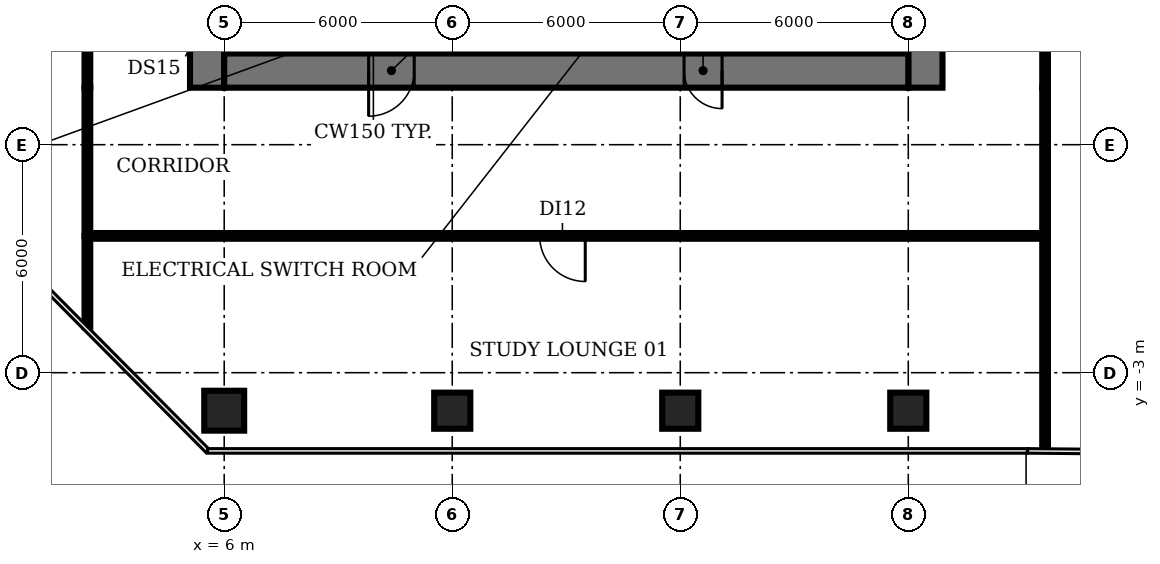
"""IFC4 building model, lengths in metres.
Left out: names, types, materials, properties, quantities, classifications, styles, units other than length and angle.
Written with IfcOpenShell. Run it as: python <this file> out.ifc"""

import sys

from ifc_helpers import new_model, si_unit, direction, frame, frame_2d, origin, origin_2d, place, context, subcontext, project, spatial, rectangle, circle, extrude, element, fill, save


model = new_model("IFC4")
c1 = context("Model", 3, precision=1e-05, world=origin(), true_north=direction((0.0, 1.0)))
c2 = subcontext(c1, "Body", "Model", "MODEL_VIEW")
j1 = project(units=[si_unit("LENGTHUNIT", "METRE"), si_unit("PLANEANGLEUNIT", "RADIAN")], contexts=[c1])
p1 = place(None, origin())
s1 = spatial("IfcSite", under=j1, at=p1, CompositionType="ELEMENT")
p2 = place(p1, origin())
s2 = spatial("IfcBuilding", under=s1, at=p2, CompositionType="ELEMENT")
p3 = place(p2, frame((0.0, 0.0, 50.0)))
s3 = spatial("IfcBuildingStorey", under=s2, at=p3, CompositionType="ELEMENT", Elevation=50.0)
p4 = place(p3, frame((6.0, -4.0, 0.0), z_axis=(0.0, 0.0, 1.0), x_axis=(1.0, 0.0, 0.0)))
e1 = element("IfcColumn", 1, at=p4, inside=s3, PredefinedType="COLUMN", context=c2, shape_type="SweptSolid", body=[
    extrude(circle(Radius=0.525, at=origin_2d()), origin(), (0.0, 0.0, 1.0), 3.85),
])
for number, where, z_axis, x_axis in (
    (2, (12.0, -4.0, 0.0), (0.0, 0.0, 1.0), (1.0, 0.0, 0.0)),
    (3, (18.0, -4.0, 0.0), (0.0, 0.0, 1.0), (1.0, 0.0, 0.0)),
    (4, (24.0, -4.0, 0.0), (0.0, 0.0, 1.0), (1.0, 0.0, 0.0)),
):
    element("IfcColumn", number, at=place(p3, frame(where, z_axis=z_axis, x_axis=x_axis)), inside=s3, PredefinedType="COLUMN", context=c2, shape_type="SweptSolid", body=[
        extrude(rectangle(XDim=0.95, YDim=0.95, at=origin_2d()), origin(), (0.0, 0.0, 1.0), 3.85),
    ])
p5 = place(p3, frame((9.275, 11.825, 0.0), z_axis=(0.0, 0.0, 1.0), x_axis=(0.0, -1.0, 0.0)))
e5 = element("IfcWall", 5, at=p5, inside=s3, PredefinedType="SHEAR", context=c2, shape_type="SweptSolid", body=[
    extrude(rectangle(XDim=6.425, YDim=0.25, at=frame_2d((3.212, 0.0))), origin(), (0.0, 0.0, 1.0), 3.85),
])
p6 = place(p5, frame((5.075, 0.0, 0.0)))
e6 = element("IfcOpeningElement", 6, at=p6, cuts=e5, PredefinedType="OPENING", context=c2, shape_type="SweptSolid", body=[
    extrude(rectangle(XDim=1.0, YDim=2.1, at=frame_2d((0.5, 1.05))), frame((0.0, 0.135, 0.0), z_axis=(0.0, -1.0, 0.0), x_axis=(1.0, 0.0, 0.0)), (0.0, 0.0, 1.0), 0.27),
])
p7 = place(p3, frame((13.5, 5.4, 0.0), z_axis=(0.0, 0.0, 1.0), x_axis=(0.0, 1.0, 0.0)))
e7 = element("IfcWall", 7, at=p7, inside=s3, PredefinedType="SHEAR", context=c2, shape_type="SweptSolid", body=[
    extrude(rectangle(XDim=8.2, YDim=0.2, at=frame_2d((4.1, 0.0))), origin(), (0.0, 0.0, 1.0), 3.85),
])
p8 = place(p7, frame((0.75, 0.0, 0.0)))
e8 = element("IfcOpeningElement", 8, at=p8, cuts=e7, PredefinedType="OPENING", context=c2, shape_type="SweptSolid", body=[
    extrude(rectangle(XDim=1.1, YDim=2.1, at=frame_2d((0.55, 1.05))), frame((0.0, 0.11, 0.0), z_axis=(0.0, -1.0, 0.0), x_axis=(1.0, 0.0, 0.0)), (0.0, 0.0, 1.0), 0.22),
])
p9 = place(p7, frame((3.55, 0.0, 0.0)))
e9 = element("IfcOpeningElement", 9, at=p9, cuts=e7, PredefinedType="OPENING", context=c2, shape_type="SweptSolid", body=[
    extrude(rectangle(XDim=1.1, YDim=2.1, at=frame_2d((0.55, 1.05))), frame((0.0, 0.11, 0.0), z_axis=(0.0, -1.0, 0.0), x_axis=(1.0, 0.0, 0.0)), (0.0, 0.0, 1.0), 0.22),
])
p10 = place(p7, frame((6.35, 0.0, 0.0)))
e10 = element("IfcOpeningElement", 10, at=p10, cuts=e7, PredefinedType="OPENING", context=c2, shape_type="SweptSolid", body=[
    extrude(rectangle(XDim=1.1, YDim=2.1, at=frame_2d((0.55, 1.05))), frame((0.0, 0.11, 0.0), z_axis=(0.0, -1.0, 0.0), x_axis=(1.0, 0.0, 0.0)), (0.0, 0.0, 1.0), 0.22),
])
p11 = place(p3, frame((16.5, 5.4, 0.0), z_axis=(0.0, 0.0, 1.0), x_axis=(0.0, 1.0, 0.0)))
e11 = element("IfcWall", 11, at=p11, inside=s3, PredefinedType="SHEAR", context=c2, shape_type="SweptSolid", body=[
    extrude(rectangle(XDim=8.2, YDim=0.2, at=frame_2d((4.1, 0.0))), origin(), (0.0, 0.0, 1.0), 3.85),
])
p12 = place(p3, frame((20.725, 5.4, 0.0), z_axis=(0.0, 0.0, 1.0), x_axis=(0.0, 1.0, 0.0)))
e12 = element("IfcWall", 12, at=p12, inside=s3, PredefinedType="SHEAR", context=c2, shape_type="SweptSolid", body=[
    extrude(rectangle(XDim=8.2, YDim=0.25, at=frame_2d((4.1, 0.0))), origin(), (0.0, 0.0, 1.0), 3.85),
])
p13 = place(p3, frame((5.55, 4.5, 0.0), z_axis=(0.0, 0.0, 1.0), x_axis=(0.0, 1.0, 0.0)))
e13 = element("IfcWall", 13, at=p13, inside=s3, PredefinedType="SHEAR", context=c2, shape_type="SweptSolid", body=[
    extrude(rectangle(XDim=21.2, YDim=0.9, at=frame_2d((10.6, 0.0))), origin(), (0.0, 0.0, 1.0), 3.85),
])
p14 = place(p13, frame((1.15, 0.0, 0.0)))
e14 = element("IfcOpeningElement", 14, at=p14, cuts=e13, PredefinedType="OPENING", context=c2, shape_type="SweptSolid", body=[
    extrude(rectangle(XDim=1.5, YDim=2.1, at=frame_2d((0.75, 1.05))), frame((0.0, 0.46, 0.0), z_axis=(0.0, -1.0, 0.0), x_axis=(1.0, 0.0, 0.0)), (0.0, 0.0, 1.0), 0.92),
])
p15 = place(p13, frame((7.6, 0.0, 0.0)))
e15 = element("IfcOpeningElement", 15, at=p15, cuts=e13, PredefinedType="OPENING", context=c2, shape_type="SweptSolid", body=[
    extrude(rectangle(XDim=1.2, YDim=2.1, at=frame_2d((0.6, 1.05))), frame((0.0, 0.46, 0.0), z_axis=(0.0, -1.0, 0.0), x_axis=(1.0, 0.0, 0.0)), (0.0, 0.0, 1.0), 0.92),
])
p16 = place(p13, frame((14.15, 0.0, 0.0)))
e16 = element("IfcOpeningElement", 16, at=p16, cuts=e13, PredefinedType="OPENING", context=c2, shape_type="SweptSolid", body=[
    extrude(rectangle(XDim=1.2, YDim=2.1, at=frame_2d((0.6, 1.05))), frame((0.0, 0.46, 0.0), z_axis=(0.0, -1.0, 0.0), x_axis=(1.0, 0.0, 0.0)), (0.0, 0.0, 1.0), 0.92),
])
p17 = place(p3, frame((24.45, 25.7, 0.0), z_axis=(0.0, 0.0, 1.0), x_axis=(0.0, -1.0, 0.0)))
e17 = element("IfcWall", 17, at=p17, inside=s3, PredefinedType="SHEAR", context=c2, shape_type="SweptSolid", body=[
    extrude(rectangle(XDim=21.2, YDim=0.9, at=frame_2d((10.6, 0.0))), origin(), (0.0, 0.0, 1.0), 3.85),
])
p18 = place(p17, frame((18.55, 0.0, 0.0)))
e18 = element("IfcOpeningElement", 18, at=p18, cuts=e17, PredefinedType="OPENING", context=c2, shape_type="SweptSolid", body=[
    extrude(rectangle(XDim=1.5, YDim=2.1, at=frame_2d((0.75, 1.05))), frame((0.0, 0.46, 0.0), z_axis=(0.0, -1.0, 0.0), x_axis=(1.0, 0.0, 0.0)), (0.0, 0.0, 1.0), 0.92),
])
p19 = place(p17, frame((12.45, 0.0, 0.0)))
e19 = element("IfcOpeningElement", 19, at=p19, cuts=e17, PredefinedType="OPENING", context=c2, shape_type="SweptSolid", body=[
    extrude(rectangle(XDim=0.9, YDim=2.1, at=frame_2d((0.45, 1.05))), frame((0.0, 0.46, 0.0), z_axis=(0.0, -1.0, 0.0), x_axis=(1.0, 0.0, 0.0)), (0.0, 0.0, 1.0), 0.92),
])
p20 = place(p17, frame((6.45, 0.0, 0.0)))
e20 = element("IfcOpeningElement", 20, at=p20, cuts=e17, PredefinedType="OPENING", context=c2, shape_type="SweptSolid", body=[
    extrude(rectangle(XDim=2.0, YDim=2.1, at=frame_2d((1.0, 1.05))), frame((0.0, 0.46, 0.0), z_axis=(0.0, -1.0, 0.0), x_axis=(1.0, 0.0, 0.0)), (0.0, 0.0, 1.0), 0.92),
])
p21 = place(p3, frame((24.0, 4.95, 0.0), z_axis=(0.0, 0.0, 1.0), x_axis=(-1.0, 0.0, 0.0)))
e21 = element("IfcWall", 21, at=p21, inside=s3, PredefinedType="SHEAR", context=c2, shape_type="SweptSolid", body=[
    extrude(rectangle(XDim=18.0, YDim=0.9, at=frame_2d((9.0, 0.0))), origin(), (0.0, 0.0, 1.0), 3.85),
])
p22 = place(p21, frame((13.0, 0.0, 0.0)))
e22 = element("IfcOpeningElement", 22, at=p22, cuts=e21, PredefinedType="OPENING", context=c2, shape_type="SweptSolid", body=[
    extrude(rectangle(XDim=1.2, YDim=2.1, at=frame_2d((0.6, 1.05))), frame((0.0, 0.46, 0.0), z_axis=(0.0, -1.0, 0.0), x_axis=(1.0, 0.0, 0.0)), (0.0, 0.0, 1.0), 0.92),
])
p23 = place(p21, frame((4.9, 0.0, 0.0)))
e23 = element("IfcOpeningElement", 23, at=p23, cuts=e21, PredefinedType="OPENING", context=c2, shape_type="SweptSolid", body=[
    extrude(rectangle(XDim=1.0, YDim=2.1, at=frame_2d((0.5, 1.05))), frame((0.0, 0.46, 0.0), z_axis=(0.0, -1.0, 0.0), x_axis=(1.0, 0.0, 0.0)), (0.0, 0.0, 1.0), 0.92),
])
p24 = place(p3, frame((2.4, -1.8, 0.0), z_axis=(0.0, 0.0, 1.0), x_axis=(0.0, 1.0, 0.0)))
e24 = element("IfcWall", 24, at=p24, inside=s3, PredefinedType="PARTITIONING", context=c2, shape_type="SweptSolid", body=[
    extrude(rectangle(XDim=2.4, YDim=0.15, at=frame_2d((1.2, 0.0))), origin(), (0.0, 0.0, 1.0), 2.83),
])
p25 = place(p3, frame((2.4, 0.6, 0.0), z_axis=(0.0, 0.0, 1.0), x_axis=(0.0, 1.0, 0.0)))
e25 = element("IfcWall", 25, at=p25, inside=s3, PredefinedType="PARTITIONING", context=c2, shape_type="SweptSolid", body=[
    extrude(rectangle(XDim=3.9, YDim=0.15, at=frame_2d((1.95, 0.0))), origin(), (0.0, 0.0, 1.0), 2.83),
])
p26 = place(p3, frame((2.4, 4.5, 0.0), z_axis=(0.0, 0.0, 1.0), x_axis=(0.0, 1.0, 0.0)))
e26 = element("IfcWall", 26, at=p26, inside=s3, PredefinedType="PARTITIONING", context=c2, shape_type="SweptSolid", body=[
    extrude(rectangle(XDim=21.2, YDim=0.15, at=frame_2d((10.6, 0.0))), origin(), (0.0, 0.0, 1.0), 2.83),
])
p27 = place(p26, frame((10.8, 0.0, 0.0)))
e27 = element("IfcOpeningElement", 27, at=p27, cuts=e26, PredefinedType="OPENING", context=c2, shape_type="SweptSolid", body=[
    extrude(rectangle(XDim=1.2, YDim=2.1, at=frame_2d((0.6, 1.05))), frame((0.0, 0.085, 0.0), z_axis=(0.0, -1.0, 0.0), x_axis=(1.0, 0.0, 0.0)), (0.0, 0.0, 1.0), 0.17),
])
p28 = place(p3, frame((27.6, -5.01, 0.0), z_axis=(0.0, 0.0, 1.0), x_axis=(0.0, 1.0, 0.0)))
e28 = element("IfcWall", 28, at=p28, inside=s3, PredefinedType="PARTITIONING", context=c2, shape_type="SweptSolid", body=[
    extrude(rectangle(XDim=5.61, YDim=0.15, at=frame_2d((2.805, 0.0))), origin(), (0.0, 0.0, 1.0), 2.83),
])
p29 = place(p3, frame((27.6, 0.6, 0.0), z_axis=(0.0, 0.0, 1.0), x_axis=(-1.0, 0.0, 0.0)))
e29 = element("IfcWall", 29, at=p29, inside=s3, PredefinedType="PARTITIONING", context=c2, shape_type="SweptSolid", body=[
    extrude(rectangle(XDim=25.2, YDim=0.15, at=frame_2d((12.6, 0.0))), origin(), (0.0, 0.0, 1.0), 2.83),
])
p30 = place(p29, frame((12.1, 0.0, 0.0)))
e30 = element("IfcOpeningElement", 30, at=p30, cuts=e29, PredefinedType="OPENING", context=c2, shape_type="SweptSolid", body=[
    extrude(rectangle(XDim=1.2, YDim=2.1, at=frame_2d((0.6, 1.05))), frame((0.0, 0.085, 0.0), z_axis=(0.0, -1.0, 0.0), x_axis=(1.0, 0.0, 0.0)), (0.0, 0.0, 1.0), 0.17),
])
p31 = place(p3, frame((27.6, 0.6, 0.0), z_axis=(0.0, 0.0, 1.0), x_axis=(0.0, 1.0, 0.0)))
e31 = element("IfcWall", 31, at=p31, inside=s3, PredefinedType="PARTITIONING", context=c2, shape_type="SweptSolid", body=[
    extrude(rectangle(XDim=3.9, YDim=0.15, at=frame_2d((1.95, 0.0))), origin(), (0.0, 0.0, 1.0), 2.83),
])
p32 = place(p3, frame((27.6, 15.0, 0.0), z_axis=(0.0, 0.0, 1.0), x_axis=(0.0, -1.0, 0.0)))
e32 = element("IfcWall", 32, at=p32, inside=s3, PredefinedType="PARTITIONING", context=c2, shape_type="SweptSolid", body=[
    extrude(rectangle(XDim=10.5, YDim=0.15, at=frame_2d((5.25, 0.0))), origin(), (0.0, 0.0, 1.0), 2.83),
])
p33 = place(p32, frame((4.8, 0.0, 0.0)))
e33 = element("IfcOpeningElement", 33, at=p33, cuts=e32, PredefinedType="OPENING", context=c2, shape_type="SweptSolid", body=[
    extrude(rectangle(XDim=1.0, YDim=2.1, at=frame_2d((0.5, 1.05))), frame((0.0, 0.085, 0.0), z_axis=(0.0, -1.0, 0.0), x_axis=(1.0, 0.0, 0.0)), (0.0, 0.0, 1.0), 0.17),
])
p34 = place(p22, origin())
e34 = element("IfcDoor", 34, at=p34, inside=s3, OperationType="SINGLE_SWING_RIGHT", PredefinedType="DOOR", context=c2, shape_type="SweptSolid", body=[
    extrude(rectangle(XDim=1.2, YDim=2.1, at=frame_2d((0.6, 1.05))), frame((0.0, 0.025, 0.0), z_axis=(0.0, -1.0, 0.0), x_axis=(1.0, 0.0, 0.0)), (0.0, 0.0, 1.0), 0.05),
])
fill(e22, e34)
p35 = place(p23, origin())
e35 = element("IfcDoor", 35, at=p35, inside=s3, OperationType="SINGLE_SWING_LEFT", PredefinedType="DOOR", context=c2, shape_type="SweptSolid", body=[
    extrude(rectangle(XDim=1.0, YDim=2.1, at=frame_2d((0.5, 1.05))), frame((0.0, -0.39, 0.0), z_axis=(0.0, -1.0, 0.0), x_axis=(1.0, 0.0, 0.0)), (0.0, 0.0, 1.0), 0.05),
])
fill(e23, e35)
p36 = place(p30, origin())
e36 = element("IfcDoor", 36, at=p36, inside=s3, OperationType="SINGLE_SWING_LEFT", PredefinedType="DOOR", context=c2, shape_type="SweptSolid", body=[
    extrude(rectangle(XDim=1.2, YDim=2.1, at=frame_2d((0.6, 1.05))), frame((0.0, 0.025, 0.0), z_axis=(0.0, -1.0, 0.0), x_axis=(1.0, 0.0, 0.0)), (0.0, 0.0, 1.0), 0.05),
])
fill(e30, e36)
save(model, sys.argv[1])
